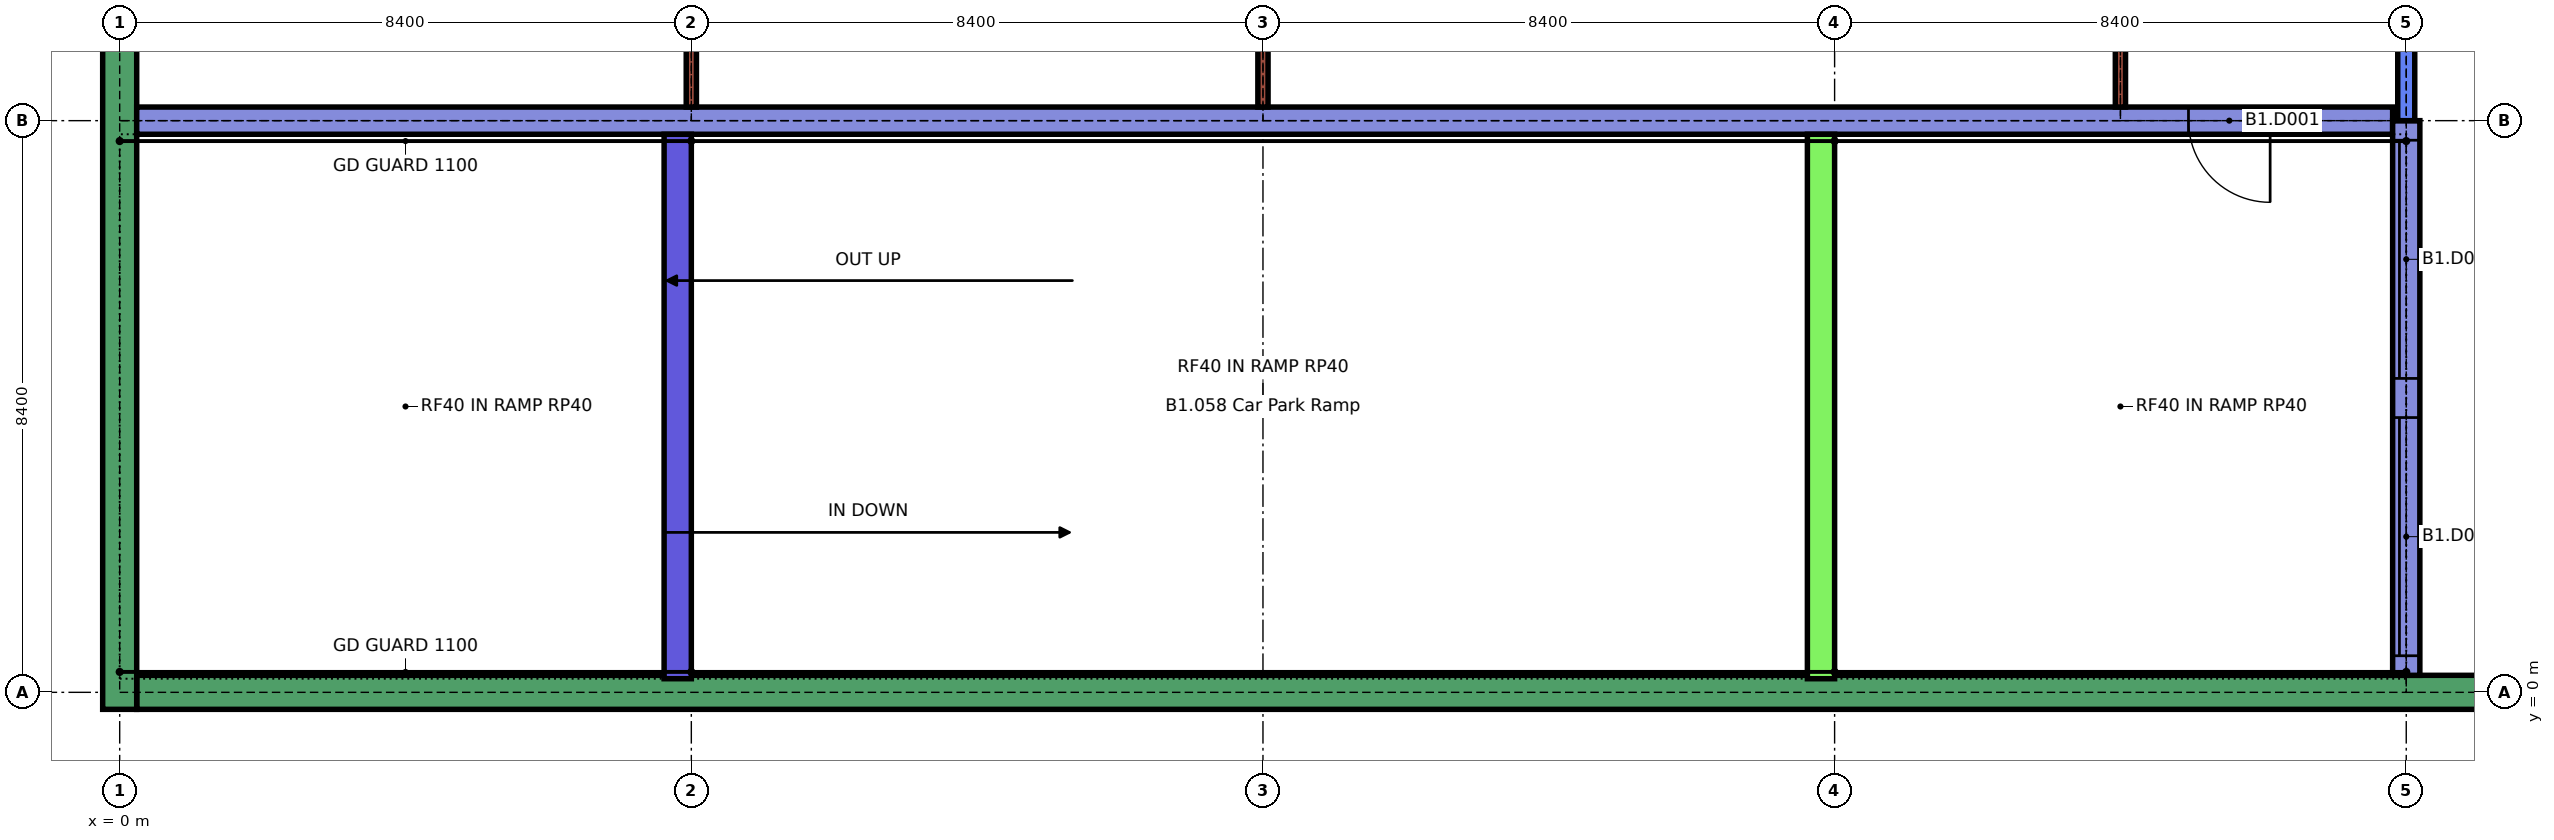
"""IFC4 building model, lengths in metres.
Left out: names, types, materials, properties, quantities, classifications, styles, units other than length and angle.
Written with IfcOpenShell. Run it as: python <this file> out.ifc"""

import sys

from ifc_helpers import new_model, si_unit, direction, frame, frame_2d, origin, place, context, subcontext, project, spatial, rectangle, extrude, element, fill, save


model = new_model("IFC4")
c1 = context("Model", 3, precision=1e-05, world=origin(), true_north=direction((0.0, 1.0)))
c2 = subcontext(c1, "Body", "Model", "MODEL_VIEW")
j1 = project(units=[si_unit("LENGTHUNIT", "METRE"), si_unit("PLANEANGLEUNIT", "RADIAN")], contexts=[c1])
p1 = place(None, origin())
s1 = spatial("IfcSite", under=j1, at=p1, CompositionType="ELEMENT")
p2 = place(p1, origin())
s2 = spatial("IfcBuilding", under=s1, at=p2, CompositionType="ELEMENT")
p3 = place(p2, frame((0.0, 0.0, -4.2)))
s3 = spatial("IfcBuildingStorey", under=s2, at=p3, CompositionType="ELEMENT", Elevation=-4.2)
p4 = place(p3, frame((0.25, 0.0, 0.0), z_axis=(0.0, 0.0, 1.0), x_axis=(1.0, 0.0, 0.0)))
e1 = element("IfcWall", 1, at=p4, inside=s3, PredefinedType="SOLIDWALL", context=c2, shape_type="SweptSolid", body=[
    extrude(rectangle(XDim=41.3, YDim=0.5, at=frame_2d((20.65, 0.0))), origin(), (0.0, 0.0, 1.0), 3.75),
])
p5 = place(p3, frame((0.0, -0.25, 0.0), z_axis=(0.0, 0.0, 1.0), x_axis=(0.0, 1.0, 0.0)))
e2 = element("IfcWall", 2, at=p5, inside=s3, PredefinedType="SOLIDWALL", context=c2, shape_type="SweptSolid", body=[
    extrude(rectangle(XDim=16.6, YDim=0.5, at=frame_2d((8.3, 0.0))), origin(), (0.0, 0.0, 1.0), 3.75),
])
p6 = place(p3, frame((0.25, 8.4, 0.0), z_axis=(0.0, 0.0, 1.0), x_axis=(1.0, 0.0, 0.0)))
e3 = element("IfcWall", 3, at=p6, inside=s3, PredefinedType="SHEAR", context=c2, shape_type="SweptSolid", body=[
    extrude(rectangle(XDim=33.15, YDim=0.4, at=frame_2d((16.575, 0.0))), origin(), (0.0, 0.0, 1.0), 3.75),
])
p7 = place(p6, frame((30.15, 0.0, 0.0)))
e4 = element("IfcOpeningElement", 4, at=p7, cuts=e3, PredefinedType="OPENING", context=c2, shape_type="SweptSolid", body=[
    extrude(rectangle(XDim=1.2, YDim=3.0, at=frame_2d((0.6, 1.5))), frame((0.0, 0.21, 0.0), z_axis=(0.0, -1.0, 0.0), x_axis=(1.0, 0.0, 0.0)), (0.0, 0.0, 1.0), 0.42),
])
p8 = place(p3, frame((8.4, 8.6, 0.0), z_axis=(0.0, 0.0, 1.0), x_axis=(0.0, 1.0, 0.0)))
e5 = element("IfcWall", 5, at=p8, inside=s3, PredefinedType="PARTITIONING", context=c2, shape_type="SweptSolid", body=[
    extrude(rectangle(XDim=7.75, YDim=0.15, at=frame_2d((3.875, 0.0))), origin(), (0.0, 0.0, 1.0), 3.75),
])
p9 = place(p3, frame((16.8, 8.6, 0.0), z_axis=(0.0, 0.0, 1.0), x_axis=(0.0, 1.0, 0.0)))
e6 = element("IfcWall", 6, at=p9, inside=s3, PredefinedType="PARTITIONING", context=c2, shape_type="SweptSolid", body=[
    extrude(rectangle(XDim=8.1, YDim=0.15, at=frame_2d((4.05, 0.0))), origin(), (0.0, 0.0, 1.0), 3.75),
])
p10 = place(p3, frame((29.4, 8.6, 0.0), z_axis=(0.0, 0.0, 1.0), x_axis=(0.0, 1.0, 0.0)))
e7 = element("IfcWall", 7, at=p10, inside=s3, PredefinedType="PARTITIONING", context=c2, shape_type="SweptSolid", body=[
    extrude(rectangle(XDim=8.2, YDim=0.15, at=frame_2d((4.1, 0.0))), origin(), (0.0, 0.0, 1.0), 3.75),
])
p11 = place(p10, frame((3.4, 0.0, 0.0)))
e8 = element("IfcOpeningElement", 8, at=p11, cuts=e7, PredefinedType="OPENING", context=c2, shape_type="SweptSolid", body=[
    extrude(rectangle(XDim=1.4, YDim=2.1, at=frame_2d((0.7, 1.05))), frame((0.0, 0.085, 0.0), z_axis=(0.0, -1.0, 0.0), x_axis=(1.0, 0.0, 0.0)), (0.0, 0.0, 1.0), 0.17),
])
p12 = place(p3, frame((33.6, 0.25, 0.0), z_axis=(0.0, 0.0, 1.0), x_axis=(0.0, 1.0, 0.0)))
e9 = element("IfcWall", 9, at=p12, inside=s3, PredefinedType="SHEAR", context=c2, shape_type="SweptSolid", body=[
    extrude(rectangle(XDim=8.15, YDim=0.4, at=frame_2d((4.075, 0.0))), origin(), (0.0, 0.0, 1.0), 3.75),
])
p13 = place(p12, frame((0.288, 0.0, 0.0)))
e10 = element("IfcOpeningElement", 10, at=p13, cuts=e9, PredefinedType="OPENING", context=c2, shape_type="SweptSolid", body=[
    extrude(rectangle(XDim=3.5, YDim=3.0, at=frame_2d((1.75, 1.5))), frame((0.0, 0.21, 0.0), z_axis=(0.0, -1.0, 0.0), x_axis=(1.0, 0.0, 0.0)), (0.0, 0.0, 1.0), 0.42),
])
p14 = place(p12, frame((4.363, 0.0, 0.0)))
e11 = element("IfcOpeningElement", 11, at=p14, cuts=e9, PredefinedType="OPENING", context=c2, shape_type="SweptSolid", body=[
    extrude(rectangle(XDim=3.5, YDim=3.0, at=frame_2d((1.75, 1.5))), frame((0.0, 0.21, 0.0), z_axis=(0.0, -1.0, 0.0), x_axis=(1.0, 0.0, 0.0)), (0.0, 0.0, 1.0), 0.42),
])
p15 = place(p3, frame((33.6, 8.4, 0.0), z_axis=(0.0, 0.0, 1.0), x_axis=(0.0, 1.0, 0.0)))
e12 = element("IfcWall", 12, at=p15, inside=s3, PredefinedType="SOLIDWALL", context=c2, shape_type="SweptSolid", body=[
    extrude(rectangle(XDim=7.95, YDim=0.25, at=frame_2d((3.975, 0.0))), origin(), (0.0, 0.0, 1.0), 3.75),
])
p16 = place(p15, frame((1.1, 0.0, 0.0)))
e13 = element("IfcOpeningElement", 13, at=p16, cuts=e12, PredefinedType="OPENING", context=c2, shape_type="SweptSolid", body=[
    extrude(rectangle(XDim=1.4, YDim=2.1, at=frame_2d((0.7, 1.05))), frame((0.0, 0.135, 0.0), z_axis=(0.0, -1.0, 0.0), x_axis=(1.0, 0.0, 0.0)), (0.0, 0.0, 1.0), 0.27),
])
p17 = place(p3, frame((8.2, 0.2, 0.0), z_axis=(0.0, 0.0, 1.0), x_axis=(0.0, 1.0, 0.0)))
e14 = element("IfcWall", 14, at=p17, inside=s3, PredefinedType="SOLIDWALL", context=c2, shape_type="SweptSolid", body=[
    extrude(rectangle(XDim=8.0, YDim=0.4, at=frame_2d((4.0, 0.0))), origin(), (0.0, 0.0, 1.0), 3.099),
])
p18 = place(p3, frame((25.0, 0.2, 0.0), z_axis=(0.0, 0.0, 1.0), x_axis=(0.0, 1.0, 0.0)))
e15 = element("IfcWall", 15, at=p18, inside=s3, PredefinedType="SOLIDWALL", context=c2, shape_type="SweptSolid", body=[
    extrude(rectangle(XDim=8.0, YDim=0.4, at=frame_2d((4.0, 0.0))), origin(), (0.0, 0.0, 1.0), 0.299),
])
p19 = place(p7, origin())
e16 = element("IfcDoor", 16, at=p19, inside=s3, OperationType="SINGLE_SWING_RIGHT", PredefinedType="DOOR", context=c2, shape_type="SweptSolid", body=[
    extrude(rectangle(XDim=1.2, YDim=3.0, at=frame_2d((0.6, 1.5))), frame((0.0, 0.025, 0.0), z_axis=(0.0, -1.0, 0.0), x_axis=(1.0, 0.0, 0.0)), (0.0, 0.0, 1.0), 0.05),
])
fill(e4, e16)
p20 = place(p13, origin())
e17 = element("IfcDoor", 17, at=p20, inside=s3, OperationType="ROLLINGUP", PredefinedType="GATE", context=c2, shape_type="SweptSolid", body=[
    extrude(rectangle(XDim=3.5, YDim=3.0, at=frame_2d((1.75, 1.5))), frame((0.0, 0.025, 0.0), z_axis=(0.0, -1.0, 0.0), x_axis=(1.0, 0.0, 0.0)), (0.0, 0.0, 1.0), 0.05),
])
fill(e10, e17)
p21 = place(p14, origin())
e18 = element("IfcDoor", 18, at=p21, inside=s3, OperationType="ROLLINGUP", PredefinedType="GATE", context=c2, shape_type="SweptSolid", body=[
    extrude(rectangle(XDim=3.5, YDim=3.0, at=frame_2d((1.75, 1.5))), frame((0.0, 0.025, 0.0), z_axis=(0.0, -1.0, 0.0), x_axis=(1.0, 0.0, 0.0)), (0.0, 0.0, 1.0), 0.05),
])
fill(e11, e18)
save(model, sys.argv[1])
